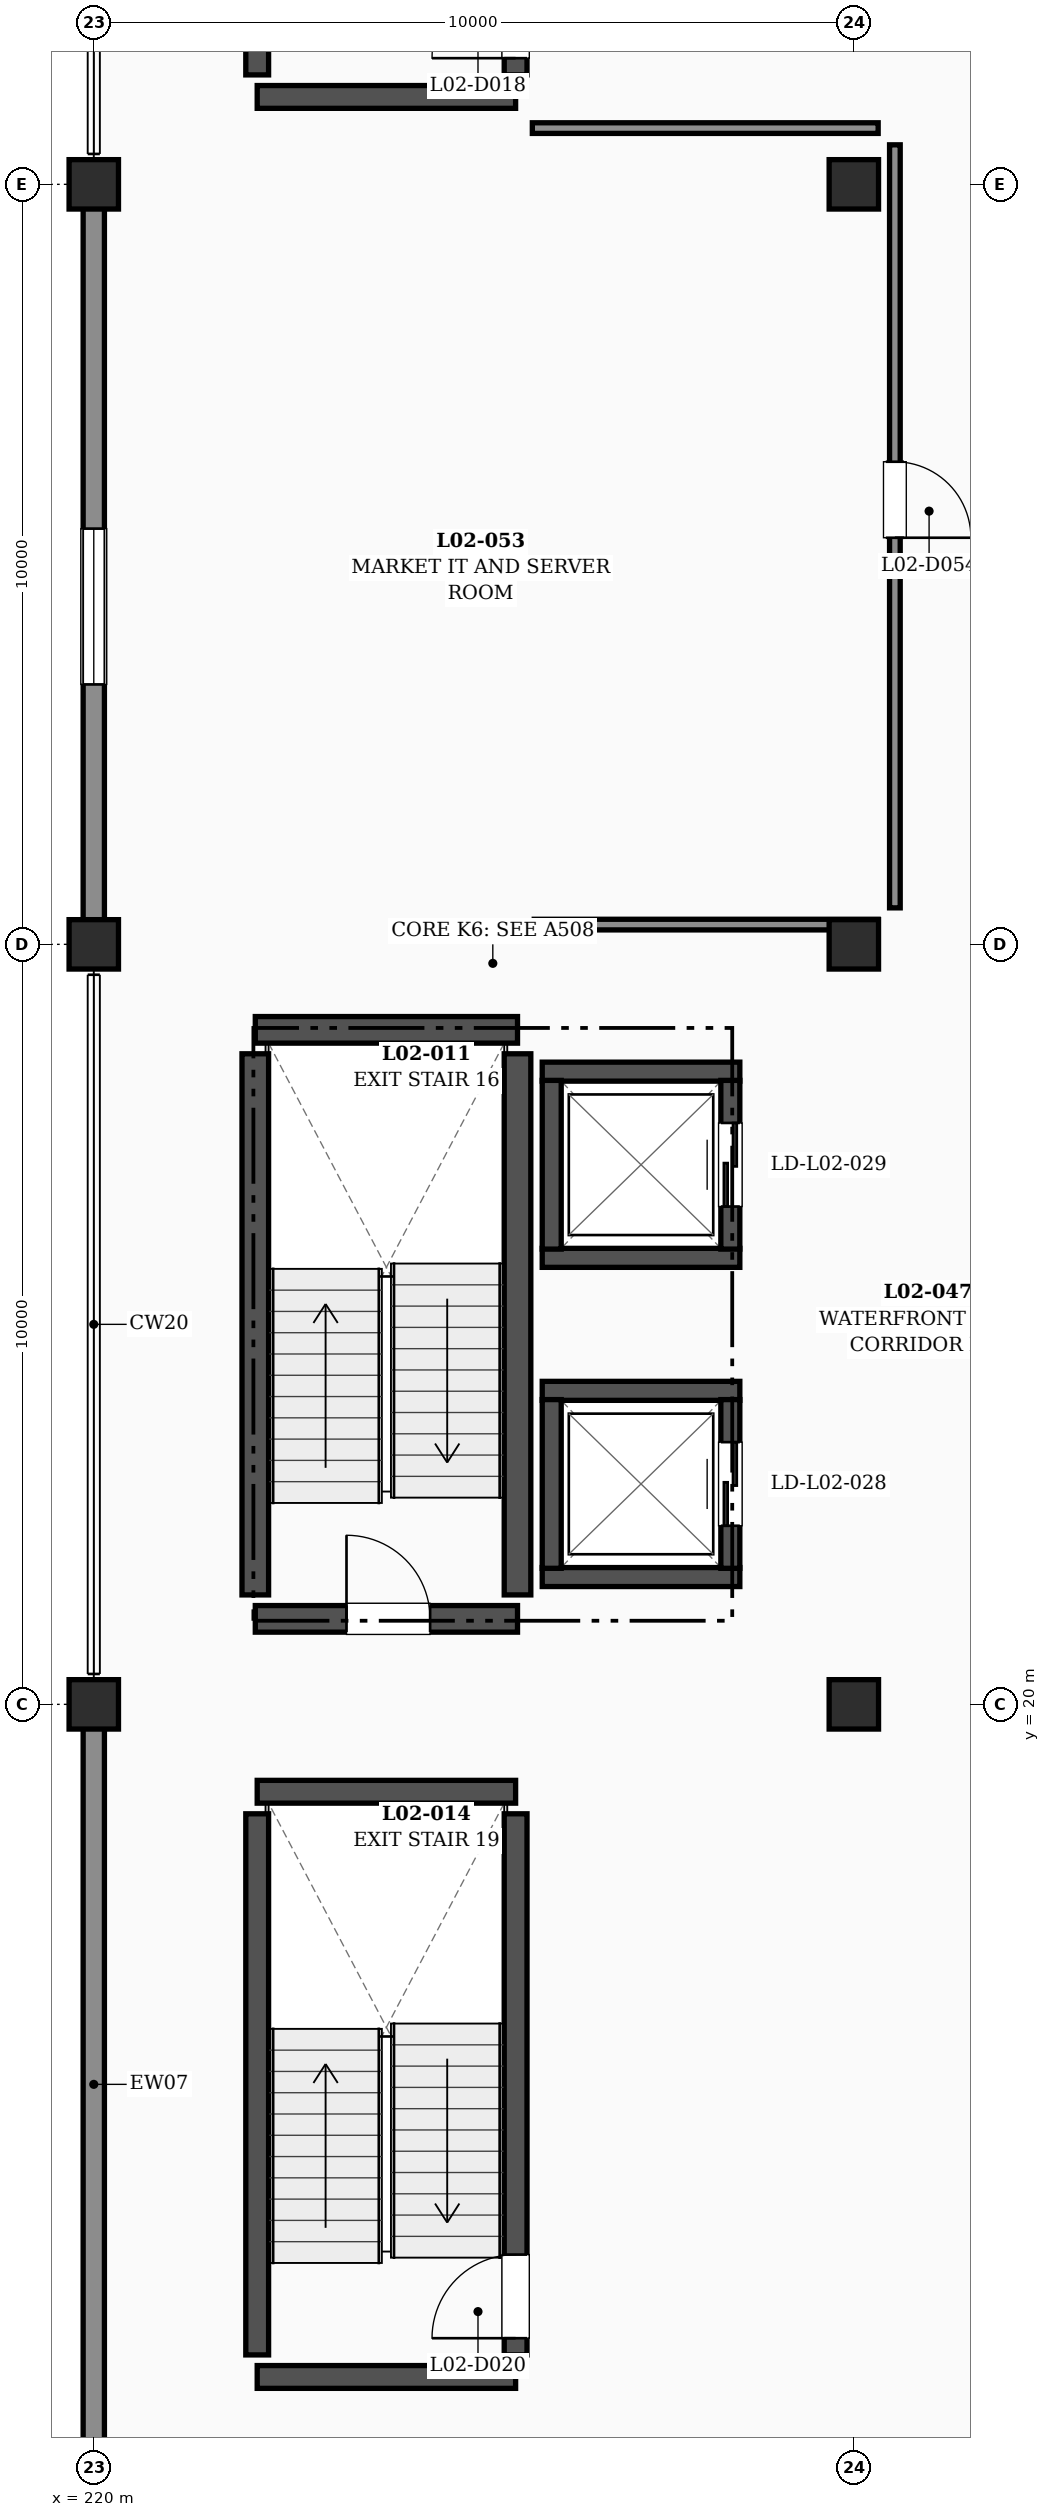
"""IFC4 building model, lengths in metres.
Left out: names, types, materials, properties, quantities, classifications, styles, units other than length and angle.
Written with IfcOpenShell. Run it as: python <this file> out.ifc"""

import sys

from ifc_helpers import new_model, si_unit, direction, frame, frame_2d, origin, origin_2d, place, context, subcontext, project, spatial, rectangle, extrude, element, fill, save


model = new_model("IFC4")
c1 = context("Model", 3, precision=1e-05, world=origin(), true_north=direction((0.0, 1.0)))
c2 = subcontext(c1, "Body", "Model", "MODEL_VIEW")
j1 = project(units=[si_unit("LENGTHUNIT", "METRE"), si_unit("PLANEANGLEUNIT", "RADIAN")], contexts=[c1])
p1 = place(None, origin())
s1 = spatial("IfcSite", under=j1, at=p1, CompositionType="ELEMENT")
p2 = place(p1, origin())
s2 = spatial("IfcBuilding", under=s1, at=p2, CompositionType="ELEMENT")
p3 = place(p2, frame((0.0, 0.0, 10.8)))
s3 = spatial("IfcBuildingStorey", under=s2, at=p3, CompositionType="ELEMENT", Elevation=10.8)
for number, where, z_axis, x_axis in (
    (1, (220.0, 20.0, 0.0), (0.0, 0.0, 1.0), (1.0, 0.0, 0.0)),
    (2, (220.0, 30.0, 0.0), (0.0, 0.0, 1.0), (1.0, 0.0, 0.0)),
    (3, (220.0, 40.0, 0.0), (0.0, 0.0, 1.0), (1.0, 0.0, 0.0)),
    (4, (230.0, 20.0, 0.0), (0.0, 0.0, 1.0), (1.0, 0.0, 0.0)),
    (5, (230.0, 30.0, 0.0), (0.0, 0.0, 1.0), (1.0, 0.0, 0.0)),
    (6, (230.0, 40.0, 0.0), (0.0, 0.0, 1.0), (1.0, 0.0, 0.0)),
):
    element("IfcColumn", number, at=place(p3, frame(where, z_axis=z_axis, x_axis=x_axis)), inside=s3, PredefinedType="COLUMN", context=c2, shape_type="SweptSolid", body=[
        extrude(rectangle(XDim=0.65, YDim=0.65, at=origin_2d()), origin(), (0.0, 0.0, 1.0), 4.2),
    ])
p4 = place(p3, frame((220.0, 10.22, 0.0), z_axis=(0.0, 0.0, 1.0), x_axis=(0.0, 1.0, 0.0)))
e7 = element("IfcWall", 7, at=p4, inside=s3, PredefinedType="SOLIDWALL", context=c2, shape_type="SweptSolid", body=[
    extrude(rectangle(XDim=9.56, YDim=0.28, at=frame_2d((4.78, 0.0))), origin(), (0.0, 0.0, 1.0), 3.16),
])
p5 = place(p3, frame((220.0, 30.22, 0.0), z_axis=(0.0, 0.0, 1.0), x_axis=(0.0, 1.0, 0.0)))
e8 = element("IfcWall", 8, at=p5, inside=s3, PredefinedType="SOLIDWALL", context=c2, shape_type="SweptSolid", body=[
    extrude(rectangle(XDim=9.56, YDim=0.28, at=frame_2d((4.78, 0.0))), origin(), (0.0, 0.0, 1.0), 3.16),
])
p6 = place(p5, frame((3.2, 0.0, 0.95)))
e9 = element("IfcOpeningElement", 9, at=p6, cuts=e8, PredefinedType="OPENING", context=c2, shape_type="SweptSolid", body=[
    extrude(rectangle(XDim=2.05, YDim=1.85, at=frame_2d((1.025, 0.925))), frame((0.0, 0.15, 0.0), z_axis=(0.0, -1.0, 0.0), x_axis=(1.0, 0.0, 0.0)), (0.0, 0.0, 1.0), 0.3),
])
p7 = place(p3, frame((222.125, 21.125, 0.0), z_axis=(0.0, 0.0, 1.0), x_axis=(1.0, 0.0, 0.0)))
e10 = element("IfcWall", 10, at=p7, inside=s3, PredefinedType="SHEAR", context=c2, shape_type="SweptSolid", body=[
    extrude(rectangle(XDim=3.45, YDim=0.35, at=frame_2d((1.725, 0.0))), origin(), (0.0, 0.0, 1.0), 4.2),
])
p8 = place(p7, frame((1.2, 0.0, 0.0)))
e11 = element("IfcOpeningElement", 11, at=p8, cuts=e10, PredefinedType="OPENING", context=c2, shape_type="SweptSolid", body=[
    extrude(rectangle(XDim=1.1, YDim=2.2, at=frame_2d((0.55, 1.1))), frame((0.0, 0.185, 0.0), z_axis=(0.0, -1.0, 0.0), x_axis=(1.0, 0.0, 0.0)), (0.0, 0.0, 1.0), 0.37),
])
p9 = place(p3, frame((222.125, 28.875, 0.0), z_axis=(0.0, 0.0, 1.0), x_axis=(1.0, 0.0, 0.0)))
e12 = element("IfcWall", 12, at=p9, inside=s3, PredefinedType="SHEAR", context=c2, shape_type="SweptSolid", body=[
    extrude(rectangle(XDim=3.45, YDim=0.35, at=frame_2d((1.725, 0.0))), origin(), (0.0, 0.0, 1.0), 4.2),
])
for number, where, z_axis, x_axis in (
    (13, (222.125, 21.44, 0.0), (0.0, 0.0, 1.0), (0.0, 1.0, 0.0)),
    (14, (225.575, 21.44, 0.0), (0.0, 0.0, 1.0), (0.0, 1.0, 0.0)),
):
    element("IfcWall", number, at=place(p3, frame(where, z_axis=z_axis, x_axis=x_axis)), inside=s3, PredefinedType="SHEAR", context=c2, shape_type="SweptSolid", body=[
        extrude(rectangle(XDim=7.12, YDim=0.35, at=frame_2d((3.56, 0.0))), origin(), (0.0, 0.0, 1.0), 4.2),
    ])
p10 = place(p3, frame((222.15, 41.15, 0.0), z_axis=(0.0, 0.0, 1.0), x_axis=(1.0, 0.0, 0.0)))
e15 = element("IfcWall", 15, at=p10, inside=s3, PredefinedType="SHEAR", context=c2, shape_type="SweptSolid", body=[
    extrude(rectangle(XDim=3.4, YDim=0.3, at=frame_2d((1.7, 0.0))), origin(), (0.0, 0.0, 1.0), 4.2),
])
p11 = place(p3, frame((222.15, 41.44, 0.0), z_axis=(0.0, 0.0, 1.0), x_axis=(0.0, 1.0, 0.0)))
e16 = element("IfcWall", 16, at=p11, inside=s3, PredefinedType="SHEAR", context=c2, shape_type="SweptSolid", body=[
    extrude(rectangle(XDim=7.12, YDim=0.3, at=frame_2d((3.56, 0.0))), origin(), (0.0, 0.0, 1.0), 4.2),
])
p12 = place(p3, frame((225.55, 41.44, 0.0), z_axis=(0.0, 0.0, 1.0), x_axis=(0.0, 1.0, 0.0)))
e17 = element("IfcWall", 17, at=p12, inside=s3, PredefinedType="SHEAR", context=c2, shape_type="SweptSolid", body=[
    extrude(rectangle(XDim=7.12, YDim=0.3, at=frame_2d((3.56, 0.0))), origin(), (0.0, 0.0, 1.0), 4.2),
])
p13 = place(p12, frame((0.22, 0.0, 0.0)))
e18 = element("IfcOpeningElement", 18, at=p13, cuts=e17, PredefinedType="OPENING", context=c2, shape_type="SweptSolid", body=[
    extrude(rectangle(XDim=1.1, YDim=2.2, at=frame_2d((0.55, 1.1))), frame((0.0, 0.16, 0.0), z_axis=(0.0, -1.0, 0.0), x_axis=(1.0, 0.0, 0.0)), (0.0, 0.0, 1.0), 0.32),
])
for number, where, z_axis, x_axis in (
    (19, (222.15, 11.15, 0.0), (0.0, 0.0, 1.0), (1.0, 0.0, 0.0)),
    (20, (222.15, 18.85, 0.0), (0.0, 0.0, 1.0), (1.0, 0.0, 0.0)),
):
    element("IfcWall", number, at=place(p3, frame(where, z_axis=z_axis, x_axis=x_axis)), inside=s3, PredefinedType="SHEAR", context=c2, shape_type="SweptSolid", body=[
        extrude(rectangle(XDim=3.4, YDim=0.3, at=frame_2d((1.7, 0.0))), origin(), (0.0, 0.0, 1.0), 4.2),
    ])
p14 = place(p3, frame((222.15, 11.44, 0.0), z_axis=(0.0, 0.0, 1.0), x_axis=(0.0, 1.0, 0.0)))
e21 = element("IfcWall", 21, at=p14, inside=s3, PredefinedType="SHEAR", context=c2, shape_type="SweptSolid", body=[
    extrude(rectangle(XDim=7.12, YDim=0.3, at=frame_2d((3.56, 0.0))), origin(), (0.0, 0.0, 1.0), 4.2),
])
p15 = place(p3, frame((225.55, 11.44, 0.0), z_axis=(0.0, 0.0, 1.0), x_axis=(0.0, 1.0, 0.0)))
e22 = element("IfcWall", 22, at=p15, inside=s3, PredefinedType="SHEAR", context=c2, shape_type="SweptSolid", body=[
    extrude(rectangle(XDim=7.12, YDim=0.3, at=frame_2d((3.56, 0.0))), origin(), (0.0, 0.0, 1.0), 4.2),
])
p16 = place(p15, frame((0.22, 0.0, 0.0)))
e23 = element("IfcOpeningElement", 23, at=p16, cuts=e22, PredefinedType="OPENING", context=c2, shape_type="SweptSolid", body=[
    extrude(rectangle(XDim=1.1, YDim=2.2, at=frame_2d((0.55, 1.1))), frame((0.0, 0.16, 0.0), z_axis=(0.0, -1.0, 0.0), x_axis=(1.0, 0.0, 0.0)), (0.0, 0.0, 1.0), 0.32),
])
for number, where, z_axis, x_axis in (
    (24, (225.9, 21.675, 0.0), (0.0, 0.0, 1.0), (1.0, 0.0, 0.0)),
    (25, (225.9, 24.125, 0.0), (0.0, 0.0, 1.0), (1.0, 0.0, 0.0)),
):
    element("IfcWall", number, at=place(p3, frame(where, z_axis=z_axis, x_axis=x_axis)), inside=s3, PredefinedType="SHEAR", context=c2, shape_type="SweptSolid", body=[
        extrude(rectangle(XDim=2.6, YDim=0.25, at=frame_2d((1.3, 0.0))), origin(), (0.0, 0.0, 1.0), 4.2),
    ])
p17 = place(p3, frame((226.025, 21.79, 0.0), z_axis=(0.0, 0.0, 1.0), x_axis=(0.0, 1.0, 0.0)))
e26 = element("IfcWall", 26, at=p17, inside=s3, PredefinedType="SHEAR", context=c2, shape_type="SweptSolid", body=[
    extrude(rectangle(XDim=2.22, YDim=0.25, at=frame_2d((1.11, 0.0))), origin(), (0.0, 0.0, 1.0), 4.2),
])
p18 = place(p3, frame((228.375, 21.79, 0.0), z_axis=(0.0, 0.0, 1.0), x_axis=(0.0, 1.0, 0.0)))
e27 = element("IfcWall", 27, at=p18, inside=s3, PredefinedType="SHEAR", context=c2, shape_type="SweptSolid", body=[
    extrude(rectangle(XDim=2.22, YDim=0.25, at=frame_2d((1.11, 0.0))), origin(), (0.0, 0.0, 1.0), 4.2),
])
p19 = place(p18, frame((0.56, 0.0, 0.0)))
e28 = element("IfcOpeningElement", 28, at=p19, cuts=e27, PredefinedType="OPENING", context=c2, shape_type="SweptSolid", body=[
    extrude(rectangle(XDim=1.1, YDim=2.2, at=frame_2d((0.55, 1.1))), frame((0.0, 0.135, 0.0), z_axis=(0.0, -1.0, 0.0), x_axis=(1.0, 0.0, 0.0)), (0.0, 0.0, 1.0), 0.27),
])
for number, where, z_axis, x_axis in (
    (29, (225.9, 25.875, 0.0), (0.0, 0.0, 1.0), (1.0, 0.0, 0.0)),
    (30, (225.9, 28.325, 0.0), (0.0, 0.0, 1.0), (1.0, 0.0, 0.0)),
):
    element("IfcWall", number, at=place(p3, frame(where, z_axis=z_axis, x_axis=x_axis)), inside=s3, PredefinedType="SHEAR", context=c2, shape_type="SweptSolid", body=[
        extrude(rectangle(XDim=2.6, YDim=0.25, at=frame_2d((1.3, 0.0))), origin(), (0.0, 0.0, 1.0), 4.2),
    ])
p20 = place(p3, frame((226.025, 25.99, 0.0), z_axis=(0.0, 0.0, 1.0), x_axis=(0.0, 1.0, 0.0)))
e31 = element("IfcWall", 31, at=p20, inside=s3, PredefinedType="SHEAR", context=c2, shape_type="SweptSolid", body=[
    extrude(rectangle(XDim=2.22, YDim=0.25, at=frame_2d((1.11, 0.0))), origin(), (0.0, 0.0, 1.0), 4.2),
])
p21 = place(p3, frame((228.375, 25.99, 0.0), z_axis=(0.0, 0.0, 1.0), x_axis=(0.0, 1.0, 0.0)))
e32 = element("IfcWall", 32, at=p21, inside=s3, PredefinedType="SHEAR", context=c2, shape_type="SweptSolid", body=[
    extrude(rectangle(XDim=2.22, YDim=0.25, at=frame_2d((1.11, 0.0))), origin(), (0.0, 0.0, 1.0), 4.2),
])
p22 = place(p21, frame((0.56, 0.0, 0.0)))
e33 = element("IfcOpeningElement", 33, at=p22, cuts=e32, PredefinedType="OPENING", context=c2, shape_type="SweptSolid", body=[
    extrude(rectangle(XDim=1.1, YDim=2.2, at=frame_2d((0.55, 1.1))), frame((0.0, 0.135, 0.0), z_axis=(0.0, -1.0, 0.0), x_axis=(1.0, 0.0, 0.0)), (0.0, 0.0, 1.0), 0.27),
])
p23 = place(p3, frame((225.77, 40.74, 0.0), z_axis=(0.0, 0.0, 1.0), x_axis=(1.0, 0.0, 0.0)))
e34 = element("IfcWall", 34, at=p23, inside=s3, PredefinedType="PARTITIONING", context=c2, shape_type="SweptSolid", body=[
    extrude(rectangle(XDim=4.55, YDim=0.14, at=frame_2d((2.275, 0.0))), origin(), (0.0, 0.0, 1.0), 3.86),
])
p24 = place(p3, frame((230.54, 40.52, 0.0), z_axis=(0.0, 0.0, 1.0), x_axis=(0.0, -1.0, 0.0)))
e35 = element("IfcWall", 35, at=p24, inside=s3, PredefinedType="PARTITIONING", context=c2, shape_type="SweptSolid", body=[
    extrude(rectangle(XDim=10.04, YDim=0.14, at=frame_2d((5.02, 0.0))), origin(), (0.0, 0.0, 1.0), 3.86),
])
p25 = place(p24, frame((4.17, 0.0, 0.0)))
e36 = element("IfcOpeningElement", 36, at=p25, cuts=e35, PredefinedType="OPENING", context=c2, shape_type="SweptSolid", body=[
    extrude(rectangle(XDim=1.0, YDim=2.2, at=frame_2d((0.5, 1.1))), frame((0.0, 0.08, 0.0), z_axis=(0.0, -1.0, 0.0), x_axis=(1.0, 0.0, 0.0)), (0.0, 0.0, 1.0), 0.16),
])
p26 = place(p3, frame((230.32, 30.26, 0.0), z_axis=(0.0, 0.0, 1.0), x_axis=(-1.0, 0.0, 0.0)))
e37 = element("IfcWall", 37, at=p26, inside=s3, PredefinedType="PARTITIONING", context=c2, shape_type="SweptSolid", body=[
    extrude(rectangle(XDim=4.525, YDim=0.14, at=frame_2d((2.263, 0.0))), origin(), (0.0, 0.0, 1.0), 3.11),
])
p27 = place(p6, origin())
e38 = element("IfcWindow", 38, at=p27, inside=s3, PartitioningType="SINGLE_PANEL", PredefinedType="WINDOW", context=c2, shape_type="SweptSolid", body=[
    extrude(rectangle(XDim=2.05, YDim=1.85, at=frame_2d((1.025, 0.925))), frame((0.0, 0.03, 0.0), z_axis=(0.0, -1.0, 0.0), x_axis=(1.0, 0.0, 0.0)), (0.0, 0.0, 1.0), 0.06),
])
fill(e9, e38)
p28 = place(p8, origin())
e39 = element("IfcDoor", 39, at=p28, inside=s3, OperationType="SINGLE_SWING_LEFT", PredefinedType="DOOR", context=c2, shape_type="SweptSolid", body=[
    extrude(rectangle(XDim=1.1, YDim=2.2, at=frame_2d((0.55, 1.1))), frame((0.0, 0.025, 0.0), z_axis=(0.0, -1.0, 0.0), x_axis=(1.0, 0.0, 0.0)), (0.0, 0.0, 1.0), 0.05),
])
fill(e11, e39)
p29 = place(p13, origin())
e40 = element("IfcDoor", 40, at=p29, inside=s3, OperationType="SINGLE_SWING_LEFT", PredefinedType="DOOR", context=c2, shape_type="SweptSolid", body=[
    extrude(rectangle(XDim=1.1, YDim=2.2, at=frame_2d((0.55, 1.1))), frame((0.0, 0.025, 0.0), z_axis=(0.0, -1.0, 0.0), x_axis=(1.0, 0.0, 0.0)), (0.0, 0.0, 1.0), 0.05),
])
fill(e18, e40)
p30 = place(p16, origin())
e41 = element("IfcDoor", 41, at=p30, inside=s3, OperationType="SINGLE_SWING_LEFT", PredefinedType="DOOR", context=c2, shape_type="SweptSolid", body=[
    extrude(rectangle(XDim=1.1, YDim=2.2, at=frame_2d((0.55, 1.1))), frame((0.0, 0.025, 0.0), z_axis=(0.0, -1.0, 0.0), x_axis=(1.0, 0.0, 0.0)), (0.0, 0.0, 1.0), 0.05),
])
fill(e23, e41)
p31 = place(p19, origin())
e42 = element("IfcDoor", 42, at=p31, inside=s3, OperationType="DOUBLE_DOOR_SLIDING", PredefinedType="DOOR", context=c2, shape_type="SweptSolid", body=[
    extrude(rectangle(XDim=1.1, YDim=2.2, at=frame_2d((0.55, 1.1))), frame((0.0, 0.025, 0.0), z_axis=(0.0, -1.0, 0.0), x_axis=(1.0, 0.0, 0.0)), (0.0, 0.0, 1.0), 0.05),
])
fill(e28, e42)
p32 = place(p22, origin())
e43 = element("IfcDoor", 43, at=p32, inside=s3, OperationType="DOUBLE_DOOR_SLIDING", PredefinedType="DOOR", context=c2, shape_type="SweptSolid", body=[
    extrude(rectangle(XDim=1.1, YDim=2.2, at=frame_2d((0.55, 1.1))), frame((0.0, 0.025, 0.0), z_axis=(0.0, -1.0, 0.0), x_axis=(1.0, 0.0, 0.0)), (0.0, 0.0, 1.0), 0.05),
])
fill(e33, e43)
p33 = place(p25, origin())
e44 = element("IfcDoor", 44, at=p33, inside=s3, OperationType="SINGLE_SWING_RIGHT", PredefinedType="DOOR", context=c2, shape_type="SweptSolid", body=[
    extrude(rectangle(XDim=1.0, YDim=2.2, at=frame_2d((0.5, 1.1))), frame((0.0, 0.025, 0.0), z_axis=(0.0, -1.0, 0.0), x_axis=(1.0, 0.0, 0.0)), (0.0, 0.0, 1.0), 0.05),
])
fill(e36, e44)
save(model, sys.argv[1])
